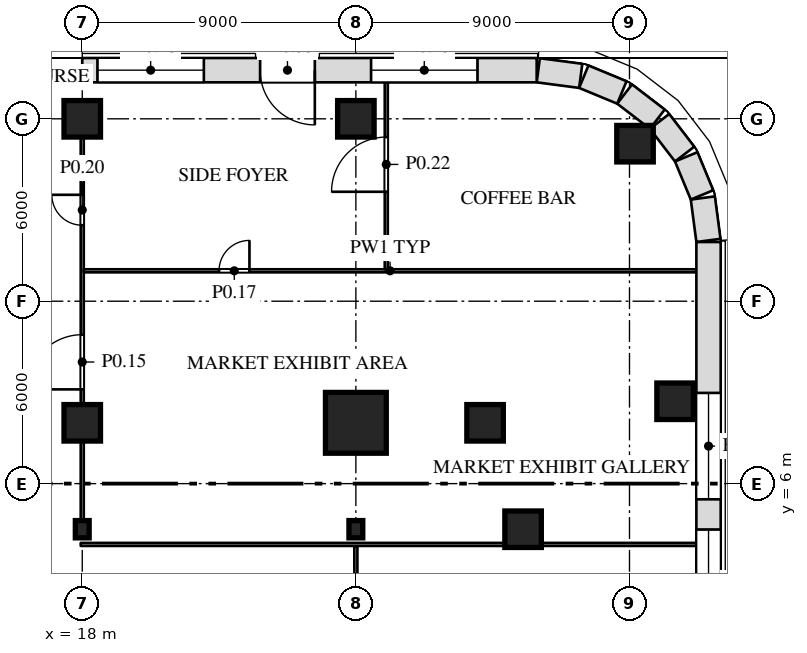
"""IFC4 building model, lengths in metres.
Left out: names, types, materials, properties, quantities, classifications, styles, units other than length and angle.
Written with IfcOpenShell. Run it as: python <this file> out.ifc"""

import sys

from ifc_helpers import new_model, si_unit, direction, frame, frame_2d, origin, origin_2d, place, context, subcontext, project, spatial, rectangle, i_section, extrude, element, fill, save


model = new_model("IFC4")
c1 = context("Model", 3, precision=1e-05, world=origin(), true_north=direction((0.0, 1.0)))
c2 = subcontext(c1, "Body", "Model", "MODEL_VIEW")
j1 = project(units=[si_unit("LENGTHUNIT", "METRE"), si_unit("PLANEANGLEUNIT", "RADIAN")], contexts=[c1])
p1 = place(None, origin())
s1 = spatial("IfcSite", under=j1, at=p1, CompositionType="ELEMENT")
p2 = place(p1, origin())
s2 = spatial("IfcBuilding", under=s1, at=p2, CompositionType="ELEMENT")
p3 = place(p2, origin())
s3 = spatial("IfcBuildingStorey", under=s2, at=p3, CompositionType="ELEMENT", Elevation=0.0)
for number, where, z_axis, x_axis in (
    (1, (18.0, 4.5, 0.0), (0.0, 0.0, 1.0), (1.0, 0.0, 0.0)),
    (2, (27.0, 4.5, 0.0), (0.0, 0.0, 1.0), (1.0, 0.0, 0.0)),
):
    element("IfcColumn", number, at=place(p3, frame(where, z_axis=z_axis, x_axis=x_axis)), inside=s3, PredefinedType="COLUMN", context=c2, shape_type="SweptSolid", body=[
        extrude(i_section(OverallWidth=0.455, OverallDepth=0.569, WebThickness=0.078, FlangeThickness=0.125, at=origin_2d()), origin(), (0.0, 0.0, 1.0), 9.0),
    ])
for number, where, z_axis, x_axis in (
    (3, (32.5, 4.5, 0.0), (0.0, 0.0, 1.0), (1.0, 0.0, 0.0)),
    (4, (18.0, 8.0, 0.0), (0.0, 0.0, 1.0), (1.0, 0.0, 0.0)),
):
    element("IfcColumn", number, at=place(p3, frame(where, z_axis=z_axis, x_axis=x_axis)), inside=s3, PredefinedType="COLUMN", context=c2, shape_type="SweptSolid", body=[
        extrude(rectangle(XDim=1.2, YDim=1.2, at=origin_2d()), origin(), (0.0, 0.0, 1.0), 9.0),
    ])
p4 = place(p3, frame((27.0, 8.0, 0.0), z_axis=(0.0, 0.0, 1.0), x_axis=(1.0, 0.0, 0.0)))
e5 = element("IfcColumn", 5, at=p4, inside=s3, PredefinedType="COLUMN", context=c2, shape_type="SweptSolid", body=[
    extrude(rectangle(XDim=2.0, YDim=2.0, at=origin_2d()), origin(), (0.0, 0.0, 1.0), 9.0),
])
for number, where, z_axis, x_axis in (
    (6, (31.25, 8.0, 0.0), (0.0, 0.0, 1.0), (1.0, 0.0, 0.0)),
    (7, (37.5, 8.709, 0.0), (0.0, 0.0, 1.0), (1.0, 0.0, 0.0)),
    (8, (36.182, 17.182, 0.0), (0.0, 0.0, 1.0), (1.0, 0.0, 0.0)),
    (9, (18.0, 18.0, 0.0), (0.0, 0.0, 1.0), (1.0, 0.0, 0.0)),
    (10, (27.0, 18.0, 0.0), (0.0, 0.0, 1.0), (1.0, 0.0, 0.0)),
):
    element("IfcColumn", number, at=place(p3, frame(where, z_axis=z_axis, x_axis=x_axis)), inside=s3, PredefinedType="COLUMN", context=c2, shape_type="SweptSolid", body=[
        extrude(rectangle(XDim=1.2, YDim=1.2, at=origin_2d()), origin(), (0.0, 0.0, 1.0), 9.0),
    ])
p5 = place(p3, frame((27.0, -2.0, 0.0), z_axis=(0.0, 0.0, 1.0), x_axis=(0.0, 1.0, 0.0)))
e11 = element("IfcWall", 11, at=p5, inside=s3, PredefinedType="PARTITIONING", context=c2, shape_type="SweptSolid", body=[
    extrude(rectangle(XDim=5.95, YDim=0.1, at=frame_2d((2.975, 0.0))), origin(), (0.0, 0.0, 1.0), 8.088),
])
p6 = place(p5, frame((2.5, 0.0, 0.0)))
e12 = element("IfcOpeningElement", 12, at=p6, cuts=e11, PredefinedType="OPENING", context=c2, shape_type="SweptSolid", body=[
    extrude(rectangle(XDim=1.0, YDim=2.1, at=frame_2d((0.5, 1.05))), frame((0.0, 0.062, 0.0), z_axis=(0.0, -1.0, 0.0), x_axis=(1.0, 0.0, 0.0)), (0.0, 0.0, 1.0), 0.124),
])
p7 = place(p3, frame((17.95, 4.0, 0.0), z_axis=(0.0, 0.0, 1.0), x_axis=(1.0, 0.0, 0.0)))
e13 = element("IfcWall", 13, at=p7, inside=s3, PredefinedType="PARTITIONING", context=c2, shape_type="SweptSolid", body=[
    extrude(rectangle(XDim=13.95, YDim=0.1, at=frame_2d((6.975, 0.0))), origin(), (0.0, 0.0, 1.0), 8.7),
])
p8 = place(p3, frame((33.1, 4.0, 0.0), z_axis=(0.0, 0.0, 1.0), x_axis=(1.0, 0.0, 0.0)))
e14 = element("IfcWall", 14, at=p8, inside=s3, PredefinedType="PARTITIONING", context=c2, shape_type="SweptSolid", body=[
    extrude(rectangle(XDim=5.1, YDim=0.1, at=frame_2d((2.55, 0.0))), origin(), (0.0, 0.0, 1.0), 8.7),
])
p9 = place(p3, frame((18.0, 4.784, 0.0), z_axis=(0.0, 0.0, 1.0), x_axis=(0.0, 1.0, 0.0)))
e15 = element("IfcWall", 15, at=p9, inside=s3, PredefinedType="PARTITIONING", context=c2, shape_type="SweptSolid", body=[
    extrude(rectangle(XDim=2.615, YDim=0.1, at=frame_2d((1.308, 0.0))), origin(), (0.0, 0.0, 1.0), 8.088),
])
p10 = place(p3, frame((18.0, 8.6, 0.0), z_axis=(0.0, 0.0, 1.0), x_axis=(0.0, 1.0, 0.0)))
e16 = element("IfcWall", 16, at=p10, inside=s3, PredefinedType="PARTITIONING", context=c2, shape_type="SweptSolid", body=[
    extrude(rectangle(XDim=8.8, YDim=0.1, at=frame_2d((4.4, 0.0))), origin(), (0.0, 0.0, 1.0), 8.088),
])
p11 = place(p10, frame((0.5, 0.0, 0.0)))
e17 = element("IfcOpeningElement", 17, at=p11, cuts=e16, PredefinedType="OPENING", context=c2, shape_type="SweptSolid", body=[
    extrude(rectangle(XDim=1.8, YDim=2.1, at=frame_2d((0.9, 1.05))), frame((0.0, 0.062, 0.0), z_axis=(0.0, -1.0, 0.0), x_axis=(1.0, 0.0, 0.0)), (0.0, 0.0, 1.0), 0.124),
])
p12 = place(p10, frame((5.9, 0.0, 0.0)))
e18 = element("IfcOpeningElement", 18, at=p12, cuts=e16, PredefinedType="OPENING", context=c2, shape_type="SweptSolid", body=[
    extrude(rectangle(XDim=1.0, YDim=2.1, at=frame_2d((0.5, 1.05))), frame((0.0, 0.062, 0.0), z_axis=(0.0, -1.0, 0.0), x_axis=(1.0, 0.0, 0.0)), (0.0, 0.0, 1.0), 0.124),
])
p13 = place(p3, frame((18.05, 13.0, 0.0), z_axis=(0.0, 0.0, 1.0), x_axis=(1.0, 0.0, 0.0)))
e19 = element("IfcWall", 19, at=p13, inside=s3, PredefinedType="PARTITIONING", context=c2, shape_type="SweptSolid", body=[
    extrude(rectangle(XDim=20.15, YDim=0.1, at=frame_2d((10.075, 0.0))), origin(), (0.0, 0.0, 1.0), 8.7),
])
p14 = place(p13, frame((4.45, 0.0, 0.0)))
e20 = element("IfcOpeningElement", 20, at=p14, cuts=e19, PredefinedType="OPENING", context=c2, shape_type="SweptSolid", body=[
    extrude(rectangle(XDim=1.0, YDim=2.1, at=frame_2d((0.5, 1.05))), frame((0.0, 0.062, 0.0), z_axis=(0.0, -1.0, 0.0), x_axis=(1.0, 0.0, 0.0)), (0.0, 0.0, 1.0), 0.124),
])
p15 = place(p3, frame((28.0, 13.05, 0.0), z_axis=(0.0, 0.0, 1.0), x_axis=(0.0, 1.0, 0.0)))
e21 = element("IfcWall", 21, at=p15, inside=s3, PredefinedType="PARTITIONING", context=c2, shape_type="SweptSolid", body=[
    extrude(rectangle(XDim=6.15, YDim=0.1, at=frame_2d((3.075, 0.0))), origin(), (0.0, 0.0, 1.0), 8.7),
])
p16 = place(p15, frame((2.55, 0.0, 0.0)))
e22 = element("IfcOpeningElement", 22, at=p16, cuts=e21, PredefinedType="OPENING", context=c2, shape_type="SweptSolid", body=[
    extrude(rectangle(XDim=1.8, YDim=2.1, at=frame_2d((0.9, 1.05))), frame((0.0, 0.062, 0.0), z_axis=(0.0, -1.0, 0.0), x_axis=(1.0, 0.0, 0.0)), (0.0, 0.0, 1.0), 0.124),
])
p17 = place(p3, frame((38.6, -21.948, 0.0), z_axis=(0.0, 0.0, 1.0), x_axis=(0.0, 1.0, 0.0)))
e23 = element("IfcWall", 23, at=p17, inside=s3, PredefinedType="SOLIDWALL", context=c2, shape_type="SweptSolid", body=[
    extrude(rectangle(XDim=35.895, YDim=0.8, at=frame_2d((17.948, 0.0))), origin(), (0.0, 0.0, 1.0), 8.7),
])
p18 = place(p17, frame((4.964, 0.0, 1.0)))
e24 = element("IfcOpeningElement", 24, at=p18, cuts=e23, PredefinedType="OPENING", context=c2, shape_type="SweptSolid", body=[
    extrude(rectangle(XDim=3.5, YDim=5.5, at=frame_2d((1.75, 2.75))), frame((0.0, 0.412, 0.0), z_axis=(0.0, -1.0, 0.0), x_axis=(1.0, 0.0, 0.0)), (0.0, 0.0, 1.0), 0.824),
])
p19 = place(p17, frame((9.458, 0.0, 1.0)))
e25 = element("IfcOpeningElement", 25, at=p19, cuts=e23, PredefinedType="OPENING", context=c2, shape_type="SweptSolid", body=[
    extrude(rectangle(XDim=3.5, YDim=5.5, at=frame_2d((1.75, 2.75))), frame((0.0, 0.412, 0.0), z_axis=(0.0, -1.0, 0.0), x_axis=(1.0, 0.0, 0.0)), (0.0, 0.0, 1.0), 0.824),
])
p20 = place(p17, frame((13.951, 0.0, 1.0)))
e26 = element("IfcOpeningElement", 26, at=p20, cuts=e23, PredefinedType="OPENING", context=c2, shape_type="SweptSolid", body=[
    extrude(rectangle(XDim=3.5, YDim=5.5, at=frame_2d((1.75, 2.75))), frame((0.0, 0.412, 0.0), z_axis=(0.0, -1.0, 0.0), x_axis=(1.0, 0.0, 0.0)), (0.0, 0.0, 1.0), 0.824),
])
p21 = place(p17, frame((22.938, 0.0, 1.0)))
e27 = element("IfcOpeningElement", 27, at=p21, cuts=e23, PredefinedType="OPENING", context=c2, shape_type="SweptSolid", body=[
    extrude(rectangle(XDim=3.5, YDim=5.5, at=frame_2d((1.75, 2.75))), frame((0.0, 0.412, 0.0), z_axis=(0.0, -1.0, 0.0), x_axis=(1.0, 0.0, 0.0)), (0.0, 0.0, 1.0), 0.824),
])
p22 = place(p17, frame((27.431, 0.0, 1.0)))
e28 = element("IfcOpeningElement", 28, at=p22, cuts=e23, PredefinedType="OPENING", context=c2, shape_type="SweptSolid", body=[
    extrude(rectangle(XDim=3.5, YDim=5.5, at=frame_2d((1.75, 2.75))), frame((0.0, 0.412, 0.0), z_axis=(0.0, -1.0, 0.0), x_axis=(1.0, 0.0, 0.0)), (0.0, 0.0, 1.0), 0.824),
])
p23 = place(p17, frame((19.294, 0.0, 0.0)))
e29 = element("IfcOpeningElement", 29, at=p23, cuts=e23, PredefinedType="OPENING", context=c2, shape_type="SweptSolid", body=[
    extrude(rectangle(XDim=1.8, YDim=2.4, at=frame_2d((0.9, 1.2))), frame((0.0, 0.412, 0.0), z_axis=(0.0, -1.0, 0.0), x_axis=(1.0, 0.0, 0.0)), (0.0, 0.0, 1.0), 0.824),
])
p24 = place(p3, frame((38.597, 14.0, 0.0), z_axis=(0.0, 0.0, 1.0), x_axis=(-0.130517283865, 0.99144603414, 0.0)))
e30 = element("IfcWall", 30, at=p24, inside=s3, PredefinedType="SOLIDWALL", context=c2, shape_type="SweptSolid", body=[
    extrude(rectangle(XDim=1.408, YDim=0.8, at=frame_2d((0.704, 0.0))), origin(), (0.0, 0.0, 1.0), 8.7),
])
p25 = place(p3, frame((38.386, 15.497, 0.0), z_axis=(0.0, 0.0, 1.0), x_axis=(-0.38276009378, 0.923847774587, 0.0)))
e31 = element("IfcWall", 31, at=p25, inside=s3, PredefinedType="SOLIDWALL", context=c2, shape_type="SweptSolid", body=[
    extrude(rectangle(XDim=1.355, YDim=0.8, at=frame_2d((0.678, 0.0))), origin(), (0.0, 0.0, 1.0), 8.7),
])
for number, where, z_axis, x_axis in (
    (32, (37.815, 16.84, 0.0), (0.0, 0.0, 1.0), (-0.609, 0.793, 0.0)),
    (33, (36.916, 17.989, 0.0), (0.0, 0.0, 1.0), (-0.793, 0.609, 0.0)),
):
    element("IfcWall", number, at=place(p3, frame(where, z_axis=z_axis, x_axis=x_axis)), inside=s3, PredefinedType="SOLIDWALL", context=c2, shape_type="SweptSolid", body=[
        extrude(rectangle(XDim=1.356, YDim=0.8, at=frame_2d((0.678, 0.0))), origin(), (0.0, 0.0, 1.0), 8.7),
    ])
p26 = place(p3, frame((35.75, 18.867, 0.0), z_axis=(0.0, 0.0, 1.0), x_axis=(-0.923847774587, 0.38276009378, 0.0)))
e34 = element("IfcWall", 34, at=p26, inside=s3, PredefinedType="SOLIDWALL", context=c2, shape_type="SweptSolid", body=[
    extrude(rectangle(XDim=1.355, YDim=0.8, at=frame_2d((0.678, 0.0))), origin(), (0.0, 0.0, 1.0), 8.7),
])
p27 = place(p3, frame((34.396, 19.413, 0.0), z_axis=(0.0, 0.0, 1.0), x_axis=(-0.99144603414, 0.130517283865, 0.0)))
e35 = element("IfcWall", 35, at=p27, inside=s3, PredefinedType="SOLIDWALL", context=c2, shape_type="SweptSolid", body=[
    extrude(rectangle(XDim=1.408, YDim=0.8, at=frame_2d((0.704, 0.0))), origin(), (0.0, 0.0, 1.0), 8.7),
])
p28 = place(p3, frame((32.948, 19.6, 0.0), z_axis=(0.0, 0.0, 1.0), x_axis=(-1.0, 0.0, 0.0)))
e36 = element("IfcWall", 36, at=p28, inside=s3, PredefinedType="SOLIDWALL", context=c2, shape_type="SweptSolid", body=[
    extrude(rectangle(XDim=14.948, YDim=0.8, at=frame_2d((7.474, 0.0))), origin(), (0.0, 0.0, 1.0), 8.7),
])
p29 = place(p28, frame((1.948, 0.0, 1.0)))
e37 = element("IfcOpeningElement", 37, at=p29, cuts=e36, PredefinedType="OPENING", context=c2, shape_type="SweptSolid", body=[
    extrude(rectangle(XDim=3.5, YDim=5.5, at=frame_2d((1.75, 2.75))), frame((0.0, 0.412, 0.0), z_axis=(0.0, -1.0, 0.0), x_axis=(1.0, 0.0, 0.0)), (0.0, 0.0, 1.0), 0.824),
])
p30 = place(p28, frame((10.948, 0.0, 1.0)))
e38 = element("IfcOpeningElement", 38, at=p30, cuts=e36, PredefinedType="OPENING", context=c2, shape_type="SweptSolid", body=[
    extrude(rectangle(XDim=3.5, YDim=5.5, at=frame_2d((1.75, 2.75))), frame((0.0, 0.412, 0.0), z_axis=(0.0, -1.0, 0.0), x_axis=(1.0, 0.0, 0.0)), (0.0, 0.0, 1.0), 0.824),
])
p31 = place(p28, frame((7.298, 0.0, 0.0)))
e39 = element("IfcOpeningElement", 39, at=p31, cuts=e36, PredefinedType="OPENING", context=c2, shape_type="SweptSolid", body=[
    extrude(rectangle(XDim=1.8, YDim=2.4, at=frame_2d((0.9, 1.2))), frame((0.0, 0.412, 0.0), z_axis=(0.0, -1.0, 0.0), x_axis=(1.0, 0.0, 0.0)), (0.0, 0.0, 1.0), 0.824),
])
p32 = place(p11, origin())
e40 = element("IfcDoor", 40, at=p32, inside=s3, OperationType="DOUBLE_DOOR_SINGLE_SWING", PredefinedType="DOOR", context=c2, shape_type="SweptSolid", body=[
    extrude(rectangle(XDim=1.8, YDim=2.1, at=frame_2d((0.9, 1.05))), frame((0.0, 0.025, 0.0), z_axis=(0.0, -1.0, 0.0), x_axis=(1.0, 0.0, 0.0)), (0.0, 0.0, 1.0), 0.05),
])
fill(e17, e40)
p33 = place(p14, origin())
e41 = element("IfcDoor", 41, at=p33, inside=s3, OperationType="SINGLE_SWING_RIGHT", PredefinedType="DOOR", context=c2, shape_type="SweptSolid", body=[
    extrude(rectangle(XDim=1.0, YDim=2.1, at=frame_2d((0.5, 1.05))), frame((0.0, 0.025, 0.0), z_axis=(0.0, -1.0, 0.0), x_axis=(1.0, 0.0, 0.0)), (0.0, 0.0, 1.0), 0.05),
])
fill(e20, e41)
p34 = place(p12, origin())
e42 = element("IfcDoor", 42, at=p34, inside=s3, OperationType="SINGLE_SWING_RIGHT", PredefinedType="DOOR", context=c2, shape_type="SweptSolid", body=[
    extrude(rectangle(XDim=1.0, YDim=2.1, at=frame_2d((0.5, 1.05))), frame((0.0, 0.025, 0.0), z_axis=(0.0, -1.0, 0.0), x_axis=(1.0, 0.0, 0.0)), (0.0, 0.0, 1.0), 0.05),
])
fill(e18, e42)
p35 = place(p16, origin())
e43 = element("IfcDoor", 43, at=p35, inside=s3, OperationType="DOUBLE_DOOR_SINGLE_SWING", PredefinedType="DOOR", context=c2, shape_type="SweptSolid", body=[
    extrude(rectangle(XDim=1.8, YDim=2.1, at=frame_2d((0.9, 1.05))), frame((0.0, 0.025, 0.0), z_axis=(0.0, -1.0, 0.0), x_axis=(1.0, 0.0, 0.0)), (0.0, 0.0, 1.0), 0.05),
])
fill(e22, e43)
p36 = place(p21, origin())
e44 = element("IfcWindow", 44, at=p36, inside=s3, PartitioningType="SINGLE_PANEL", PredefinedType="WINDOW", context=c2, shape_type="SweptSolid", body=[
    extrude(rectangle(XDim=3.5, YDim=5.5, at=frame_2d((1.75, 2.75))), frame((0.0, 0.03, 0.0), z_axis=(0.0, -1.0, 0.0), x_axis=(1.0, 0.0, 0.0)), (0.0, 0.0, 1.0), 0.06),
])
fill(e27, e44)
p37 = place(p22, origin())
e45 = element("IfcWindow", 45, at=p37, inside=s3, PartitioningType="SINGLE_PANEL", PredefinedType="WINDOW", context=c2, shape_type="SweptSolid", body=[
    extrude(rectangle(XDim=3.5, YDim=5.5, at=frame_2d((1.75, 2.75))), frame((0.0, 0.03, 0.0), z_axis=(0.0, -1.0, 0.0), x_axis=(1.0, 0.0, 0.0)), (0.0, 0.0, 1.0), 0.06),
])
fill(e28, e45)
p38 = place(p29, origin())
e46 = element("IfcWindow", 46, at=p38, inside=s3, PartitioningType="SINGLE_PANEL", PredefinedType="WINDOW", context=c2, shape_type="SweptSolid", body=[
    extrude(rectangle(XDim=3.5, YDim=5.5, at=frame_2d((1.75, 2.75))), frame((0.0, 0.03, 0.0), z_axis=(0.0, -1.0, 0.0), x_axis=(1.0, 0.0, 0.0)), (0.0, 0.0, 1.0), 0.06),
])
fill(e37, e46)
p39 = place(p30, origin())
e47 = element("IfcWindow", 47, at=p39, inside=s3, PartitioningType="SINGLE_PANEL", PredefinedType="WINDOW", context=c2, shape_type="SweptSolid", body=[
    extrude(rectangle(XDim=3.5, YDim=5.5, at=frame_2d((1.75, 2.75))), frame((0.0, 0.03, 0.0), z_axis=(0.0, -1.0, 0.0), x_axis=(1.0, 0.0, 0.0)), (0.0, 0.0, 1.0), 0.06),
])
fill(e38, e47)
p40 = place(p31, frame((1.8, 0.0, 0.0), z_axis=(0.0, 0.0, 1.0), x_axis=(-1.0, 0.0, 0.0)))
e48 = element("IfcDoor", 48, at=p40, inside=s3, OperationType="DOUBLE_DOOR_SINGLE_SWING", PredefinedType="DOOR", context=c2, shape_type="SweptSolid", body=[
    extrude(rectangle(XDim=1.8, YDim=2.4, at=frame_2d((0.9, 1.2))), frame((0.0, 0.025, 0.0), z_axis=(0.0, -1.0, 0.0), x_axis=(1.0, 0.0, 0.0)), (0.0, 0.0, 1.0), 0.05),
])
fill(e39, e48)
save(model, sys.argv[1])
